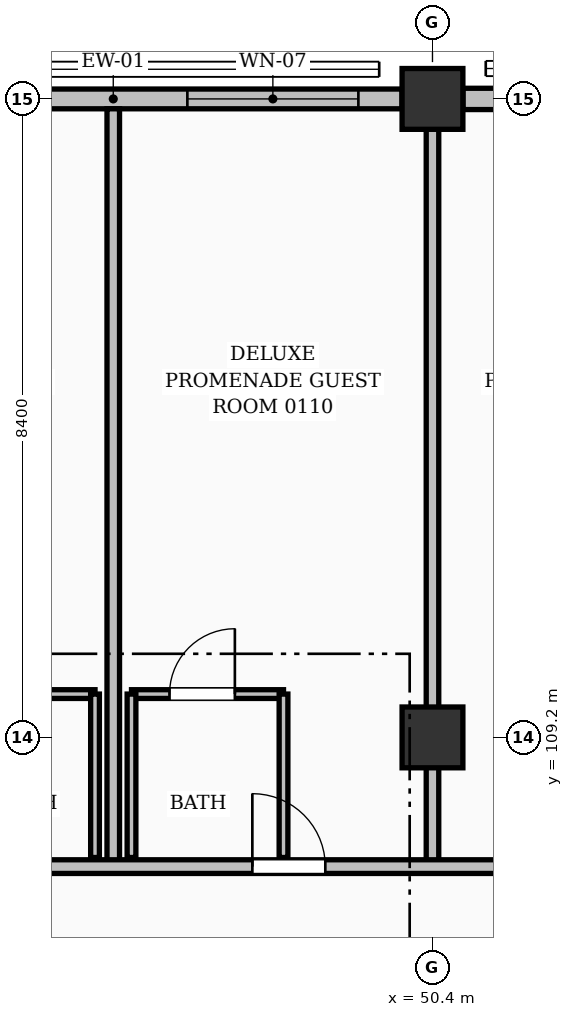
"""IFC4 building model, lengths in metres.
Left out: names, types, materials, properties, quantities, classifications, styles, units other than length and angle.
Written with IfcOpenShell. Run it as: python <this file> out.ifc"""

import sys

from ifc_helpers import new_model, si_unit, direction, frame, frame_2d, origin, origin_2d, place, context, subcontext, project, spatial, rectangle, extrude, element, fill, save


model = new_model("IFC4")
c1 = context("Model", 3, precision=1e-05, world=origin(), true_north=direction((0.0, 1.0)))
c2 = subcontext(c1, "Body", "Model", "MODEL_VIEW")
j1 = project(units=[si_unit("LENGTHUNIT", "METRE"), si_unit("PLANEANGLEUNIT", "RADIAN")], contexts=[c1])
p1 = place(None, origin())
s1 = spatial("IfcSite", under=j1, at=p1, CompositionType="ELEMENT")
p2 = place(p1, origin())
s2 = spatial("IfcBuilding", under=s1, at=p2, CompositionType="ELEMENT")
p3 = place(p2, frame((0.0, 0.0, 3.92)))
s3 = spatial("IfcBuildingStorey", under=s2, at=p3, CompositionType="ELEMENT", Elevation=3.92)
for number, where, z_axis, x_axis in (
    (1, (50.4, 109.2, 0.0), (0.0, 0.0, 1.0), (1.0, 0.0, 0.0)),
    (2, (50.4, 117.6, 0.0), (0.0, 0.0, 1.0), (1.0, 0.0, 0.0)),
):
    element("IfcColumn", number, at=place(p3, frame(where, z_axis=z_axis, x_axis=x_axis)), inside=s3, PredefinedType="COLUMN", context=c2, shape_type="SweptSolid", body=[
        extrude(rectangle(XDim=0.8, YDim=0.8, at=origin_2d()), origin(), (0.0, 0.0, 1.0), 3.64),
    ])
p4 = place(p3, frame((42.401, 117.6, 0.0), z_axis=(0.0, 0.0, 1.0), x_axis=(1.0, 0.0, 0.0)))
e3 = element("IfcWall", 3, at=p4, inside=s3, PredefinedType="SOLIDWALL", context=c2, shape_type="SweptSolid", body=[
    extrude(rectangle(XDim=7.598, YDim=0.26, at=frame_2d((3.799, 0.0))), origin(), (0.0, 0.0, 1.0), 2.445),
])
p5 = place(p4, frame((0.574, 0.0, 0.25)))
e4 = element("IfcOpeningElement", 4, at=p5, cuts=e3, PredefinedType="OPENING", context=c2, shape_type="SweptSolid", body=[
    extrude(rectangle(XDim=2.25, YDim=1.85, at=frame_2d((1.125, 0.925))), frame((0.0, 0.14, 0.0), z_axis=(0.0, -1.0, 0.0), x_axis=(1.0, 0.0, 0.0)), (0.0, 0.0, 1.0), 0.28),
])
p6 = place(p4, frame((4.774, 0.0, 0.25)))
e5 = element("IfcOpeningElement", 5, at=p6, cuts=e3, PredefinedType="OPENING", context=c2, shape_type="SweptSolid", body=[
    extrude(rectangle(XDim=2.25, YDim=1.95, at=frame_2d((1.125, 0.975))), frame((0.0, 0.14, 0.0), z_axis=(0.0, -1.0, 0.0), x_axis=(1.0, 0.0, 0.0)), (0.0, 0.0, 1.0), 0.28),
])
p7 = place(p3, frame((50.801, 117.6, 0.0), z_axis=(0.0, 0.0, 1.0), x_axis=(1.0, 0.0, 0.0)))
e6 = element("IfcWall", 6, at=p7, inside=s3, PredefinedType="SOLIDWALL", context=c2, shape_type="SweptSolid", body=[
    extrude(rectangle(XDim=7.598, YDim=0.28, at=frame_2d((3.799, 0.0))), origin(), (0.0, 0.0, 1.0), 2.445),
])
p8 = place(p7, frame((0.574, 0.0, 0.25)))
e7 = element("IfcOpeningElement", 7, at=p8, cuts=e6, PredefinedType="OPENING", context=c2, shape_type="SweptSolid", body=[
    extrude(rectangle(XDim=2.25, YDim=1.95, at=frame_2d((1.125, 0.975))), frame((0.0, 0.15, 0.0), z_axis=(0.0, -1.0, 0.0), x_axis=(1.0, 0.0, 0.0)), (0.0, 0.0, 1.0), 0.3),
])
p9 = place(p7, frame((4.749, 0.0, 0.25)))
e8 = element("IfcOpeningElement", 8, at=p9, cuts=e6, PredefinedType="OPENING", context=c2, shape_type="SweptSolid", body=[
    extrude(rectangle(XDim=2.3, YDim=1.75, at=frame_2d((1.15, 0.875))), frame((0.0, 0.15, 0.0), z_axis=(0.0, -1.0, 0.0), x_axis=(1.0, 0.0, 0.0)), (0.0, 0.0, 1.0), 0.3),
])
p10 = place(p3, frame((43.96, 109.77, 0.0), z_axis=(0.0, 0.0, 1.0), x_axis=(1.0, 0.0, 0.0)))
e9 = element("IfcWall", 9, at=p10, inside=s3, PredefinedType="PARTITIONING", context=c2, shape_type="SweptSolid", body=[
    extrude(rectangle(XDim=2.0, YDim=0.115, at=frame_2d((1.0, 0.0))), origin(), (0.0, 0.0, 1.0), 3.36),
])
p11 = place(p10, frame((0.5, 0.0, 0.0)))
e10 = element("IfcOpeningElement", 10, at=p11, cuts=e9, PredefinedType="OPENING", context=c2, shape_type="SweptSolid", body=[
    extrude(rectangle(XDim=0.86, YDim=2.05, at=frame_2d((0.43, 1.025))), frame((0.0, 0.067, 0.0), z_axis=(0.0, -1.0, 0.0), x_axis=(1.0, 0.0, 0.0)), (0.0, 0.0, 1.0), 0.135),
])
p12 = place(p3, frame((45.96, 107.62, 0.0), z_axis=(0.0, 0.0, 1.0), x_axis=(0.0, 1.0, 0.0)))
e11 = element("IfcWall", 11, at=p12, inside=s3, PredefinedType="PARTITIONING", context=c2, shape_type="SweptSolid", body=[
    extrude(rectangle(XDim=2.15, YDim=0.115, at=frame_2d((1.075, 0.0))), origin(), (0.0, 0.0, 1.0), 3.36),
])
p13 = place(p3, frame((46.44, 109.77, 0.0), z_axis=(0.0, 0.0, 1.0), x_axis=(1.0, 0.0, 0.0)))
e12 = element("IfcWall", 12, at=p13, inside=s3, PredefinedType="PARTITIONING", context=c2, shape_type="SweptSolid", body=[
    extrude(rectangle(XDim=2.0, YDim=0.115, at=frame_2d((1.0, 0.0))), origin(), (0.0, 0.0, 1.0), 3.36),
])
p14 = place(p13, frame((0.5, 0.0, 0.0)))
e13 = element("IfcOpeningElement", 13, at=p14, cuts=e12, PredefinedType="OPENING", context=c2, shape_type="SweptSolid", body=[
    extrude(rectangle(XDim=0.86, YDim=2.05, at=frame_2d((0.43, 1.025))), frame((0.0, 0.067, 0.0), z_axis=(0.0, -1.0, 0.0), x_axis=(1.0, 0.0, 0.0)), (0.0, 0.0, 1.0), 0.135),
])
p15 = place(p3, frame((46.44, 107.62, 0.0), z_axis=(0.0, 0.0, 1.0), x_axis=(0.0, 1.0, 0.0)))
e14 = element("IfcWall", 14, at=p15, inside=s3, PredefinedType="PARTITIONING", context=c2, shape_type="SweptSolid", body=[
    extrude(rectangle(XDim=2.15, YDim=0.115, at=frame_2d((1.075, 0.0))), origin(), (0.0, 0.0, 1.0), 3.36),
])
p16 = place(p3, frame((48.44, 107.62, 0.0), z_axis=(0.0, 0.0, 1.0), x_axis=(0.0, 1.0, 0.0)))
e15 = element("IfcWall", 15, at=p16, inside=s3, PredefinedType="PARTITIONING", context=c2, shape_type="SweptSolid", body=[
    extrude(rectangle(XDim=2.15, YDim=0.115, at=frame_2d((1.075, 0.0))), origin(), (0.0, 0.0, 1.0), 2.882),
])
p17 = place(p3, frame((46.2, 107.5, 0.0), z_axis=(0.0, 0.0, 1.0), x_axis=(0.0, 1.0, 0.0)))
e16 = element("IfcWall", 16, at=p17, inside=s3, PredefinedType="PARTITIONING", context=c2, shape_type="SweptSolid", body=[
    extrude(rectangle(XDim=9.97, YDim=0.165, at=frame_2d((4.985, 0.0))), origin(), (0.0, 0.0, 1.0), 3.36),
])
p18 = place(p3, frame((50.4, 107.5, 0.0), z_axis=(0.0, 0.0, 1.0), x_axis=(0.0, 1.0, 0.0)))
e17 = element("IfcWall", 17, at=p18, inside=s3, PredefinedType="PARTITIONING", context=c2, shape_type="SweptSolid", body=[
    extrude(rectangle(XDim=9.75, YDim=0.165, at=frame_2d((4.875, 0.0))), origin(), (0.0, 0.0, 1.0), 2.495),
])
p19 = place(p3, frame((40.66, 107.5, 0.0), z_axis=(0.0, 0.0, 1.0), x_axis=(1.0, 0.0, 0.0)))
e18 = element("IfcWall", 18, at=p19, inside=s3, PredefinedType="PARTITIONING", context=c2, shape_type="SweptSolid", body=[
    extrude(rectangle(XDim=43.15, YDim=0.18, at=frame_2d((21.575, 0.0))), origin(), (0.0, 0.0, 1.0), 3.36),
])
p20 = place(p19, frame((0.2, 0.0, 0.0)))
e19 = element("IfcOpeningElement", 19, at=p20, cuts=e18, PredefinedType="OPENING", context=c2, shape_type="SweptSolid", body=[
    extrude(rectangle(XDim=0.94, YDim=2.1, at=frame_2d((0.47, 1.05))), frame((0.0, 0.1, 0.0), z_axis=(0.0, -1.0, 0.0), x_axis=(1.0, 0.0, 0.0)), (0.0, 0.0, 1.0), 0.2),
])
p21 = place(p19, frame((2.71, 0.0, 0.0)))
e20 = element("IfcOpeningElement", 20, at=p21, cuts=e18, PredefinedType="OPENING", context=c2, shape_type="SweptSolid", body=[
    extrude(rectangle(XDim=0.96, YDim=2.15, at=frame_2d((0.48, 1.075))), frame((0.0, 0.1, 0.0), z_axis=(0.0, -1.0, 0.0), x_axis=(1.0, 0.0, 0.0)), (0.0, 0.0, 1.0), 0.2),
])
p22 = place(p19, frame((7.37, 0.0, 0.0)))
e21 = element("IfcOpeningElement", 21, at=p22, cuts=e18, PredefinedType="OPENING", context=c2, shape_type="SweptSolid", body=[
    extrude(rectangle(XDim=0.96, YDim=2.15, at=frame_2d((0.48, 1.075))), frame((0.0, 0.1, 0.0), z_axis=(0.0, -1.0, 0.0), x_axis=(1.0, 0.0, 0.0)), (0.0, 0.0, 1.0), 0.2),
])
p23 = place(p19, frame((11.11, 0.0, 0.0)))
e22 = element("IfcOpeningElement", 22, at=p23, cuts=e18, PredefinedType="OPENING", context=c2, shape_type="SweptSolid", body=[
    extrude(rectangle(XDim=0.96, YDim=2.15, at=frame_2d((0.48, 1.075))), frame((0.0, 0.1, 0.0), z_axis=(0.0, -1.0, 0.0), x_axis=(1.0, 0.0, 0.0)), (0.0, 0.0, 1.0), 0.2),
])
p24 = place(p19, frame((15.77, 0.0, 0.0)))
e23 = element("IfcOpeningElement", 23, at=p24, cuts=e18, PredefinedType="OPENING", context=c2, shape_type="SweptSolid", body=[
    extrude(rectangle(XDim=0.96, YDim=2.15, at=frame_2d((0.48, 1.075))), frame((0.0, 0.1, 0.0), z_axis=(0.0, -1.0, 0.0), x_axis=(1.0, 0.0, 0.0)), (0.0, 0.0, 1.0), 0.2),
])
p25 = place(p19, frame((19.51, 0.0, 0.0)))
e24 = element("IfcOpeningElement", 24, at=p25, cuts=e18, PredefinedType="OPENING", context=c2, shape_type="SweptSolid", body=[
    extrude(rectangle(XDim=0.96, YDim=2.15, at=frame_2d((0.48, 1.075))), frame((0.0, 0.1, 0.0), z_axis=(0.0, -1.0, 0.0), x_axis=(1.0, 0.0, 0.0)), (0.0, 0.0, 1.0), 0.2),
])
p26 = place(p19, frame((24.17, 0.0, 0.0)))
e25 = element("IfcOpeningElement", 25, at=p26, cuts=e18, PredefinedType="OPENING", context=c2, shape_type="SweptSolid", body=[
    extrude(rectangle(XDim=0.96, YDim=2.15, at=frame_2d((0.48, 1.075))), frame((0.0, 0.1, 0.0), z_axis=(0.0, -1.0, 0.0), x_axis=(1.0, 0.0, 0.0)), (0.0, 0.0, 1.0), 0.2),
])
p27 = place(p19, frame((27.91, 0.0, 0.0)))
e26 = element("IfcOpeningElement", 26, at=p27, cuts=e18, PredefinedType="OPENING", context=c2, shape_type="SweptSolid", body=[
    extrude(rectangle(XDim=0.96, YDim=2.15, at=frame_2d((0.48, 1.075))), frame((0.0, 0.1, 0.0), z_axis=(0.0, -1.0, 0.0), x_axis=(1.0, 0.0, 0.0)), (0.0, 0.0, 1.0), 0.2),
])
p28 = place(p19, frame((32.57, 0.0, 0.0)))
e27 = element("IfcOpeningElement", 27, at=p28, cuts=e18, PredefinedType="OPENING", context=c2, shape_type="SweptSolid", body=[
    extrude(rectangle(XDim=0.96, YDim=2.15, at=frame_2d((0.48, 1.075))), frame((0.0, 0.1, 0.0), z_axis=(0.0, -1.0, 0.0), x_axis=(1.0, 0.0, 0.0)), (0.0, 0.0, 1.0), 0.2),
])
p29 = place(p19, frame((36.31, 0.0, 0.0)))
e28 = element("IfcOpeningElement", 28, at=p29, cuts=e18, PredefinedType="OPENING", context=c2, shape_type="SweptSolid", body=[
    extrude(rectangle(XDim=0.96, YDim=2.15, at=frame_2d((0.48, 1.075))), frame((0.0, 0.1, 0.0), z_axis=(0.0, -1.0, 0.0), x_axis=(1.0, 0.0, 0.0)), (0.0, 0.0, 1.0), 0.2),
])
p30 = place(p19, frame((40.97, 0.0, 0.0)))
e29 = element("IfcOpeningElement", 29, at=p30, cuts=e18, PredefinedType="OPENING", context=c2, shape_type="SweptSolid", body=[
    extrude(rectangle(XDim=0.96, YDim=2.15, at=frame_2d((0.48, 1.075))), frame((0.0, 0.1, 0.0), z_axis=(0.0, -1.0, 0.0), x_axis=(1.0, 0.0, 0.0)), (0.0, 0.0, 1.0), 0.2),
])
p31 = place(p6, origin())
e30 = element("IfcWindow", 30, at=p31, inside=s3, PartitioningType="DOUBLE_PANEL_VERTICAL", PredefinedType="WINDOW", context=c2, shape_type="SweptSolid", body=[
    extrude(rectangle(XDim=2.25, YDim=1.95, at=frame_2d((1.125, 0.975))), frame((0.0, 0.03, 0.0), z_axis=(0.0, -1.0, 0.0), x_axis=(1.0, 0.0, 0.0)), (0.0, 0.0, 1.0), 0.06),
])
fill(e5, e30)
p32 = place(p14, origin())
e31 = element("IfcDoor", 31, at=p32, inside=s3, OperationType="SINGLE_SWING_RIGHT", PredefinedType="DOOR", context=c2, shape_type="SweptSolid", body=[
    extrude(rectangle(XDim=0.86, YDim=2.05, at=frame_2d((0.43, 1.025))), frame((0.0, 0.025, 0.0), z_axis=(0.0, -1.0, 0.0), x_axis=(1.0, 0.0, 0.0)), (0.0, 0.0, 1.0), 0.05),
])
fill(e13, e31)
p33 = place(p22, origin())
e32 = element("IfcDoor", 32, at=p33, inside=s3, OperationType="SINGLE_SWING_LEFT", PredefinedType="DOOR", context=c2, shape_type="SweptSolid", body=[
    extrude(rectangle(XDim=0.96, YDim=2.15, at=frame_2d((0.48, 1.075))), frame((0.0, 0.025, 0.0), z_axis=(0.0, -1.0, 0.0), x_axis=(1.0, 0.0, 0.0)), (0.0, 0.0, 1.0), 0.05),
])
fill(e21, e32)
save(model, sys.argv[1])
